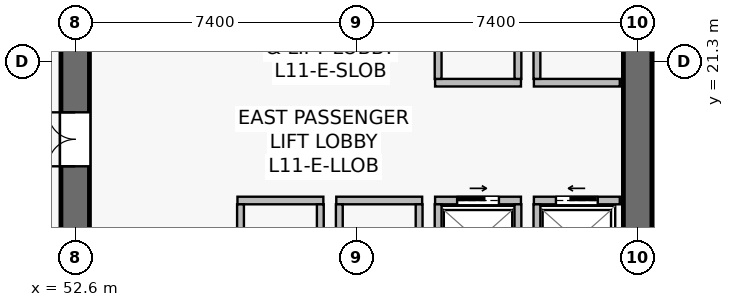
"""IFC4 building model, lengths in metres.
Left out: names, types, materials, properties, quantities, classifications, styles, units other than length and angle.
Written with IfcOpenShell. Run it as: python <this file> out.ifc"""

import sys

from ifc_helpers import new_model, si_unit, direction, frame, frame_2d, origin, place, context, subcontext, project, spatial, rectangle, extrude, source, transform, mapped, element, fill, save


model = new_model("IFC4")
c1 = context("Model", 3, precision=1e-05, world=origin(), true_north=direction((0.0, 1.0)))
c2 = subcontext(c1, "Body", "Model", "MODEL_VIEW")
j1 = project(units=[si_unit("LENGTHUNIT", "METRE"), si_unit("PLANEANGLEUNIT", "RADIAN")], contexts=[c1])
p1 = place(None, origin())
s1 = spatial("IfcSite", under=j1, at=p1, CompositionType="ELEMENT")
p2 = place(p1, origin())
s2 = spatial("IfcBuilding", under=s1, at=p2, CompositionType="ELEMENT")
p3 = place(p2, frame((0.0, 0.0, 45.7)))
s3 = spatial("IfcBuildingStorey", under=s2, at=p3, CompositionType="ELEMENT", Elevation=45.7)
p4 = place(p3, frame((52.6, 15.175, 0.0), z_axis=(0.0, 0.0, 1.0), x_axis=(0.0, 1.0, 0.0)))
e1 = element("IfcWall", 1, at=p4, inside=s3, PredefinedType="SHEAR", context=c2, shape_type="SweptSolid", body=[
    extrude(rectangle(XDim=18.25, YDim=0.75, at=frame_2d((9.125, 0.0))), origin(), (0.0, 0.0, 1.0), 3.78),
])
p5 = place(p4, frame((3.375, 0.0, 0.0)))
e2 = element("IfcOpeningElement", 2, at=p5, cuts=e1, PredefinedType="OPENING", context=c2, shape_type="SweptSolid", body=[
    extrude(rectangle(XDim=1.42, YDim=2.2, at=frame_2d((0.71, 1.1))), frame((0.0, 0.385, 0.0), z_axis=(0.0, -1.0, 0.0), x_axis=(1.0, 0.0, 0.0)), (0.0, 0.0, 1.0), 0.77),
])
p6 = place(p3, frame((67.4, 15.175, 0.0), z_axis=(0.0, 0.0, 1.0), x_axis=(0.0, 1.0, 0.0)))
e3 = element("IfcWall", 3, at=p6, inside=s3, PredefinedType="SHEAR", context=c2, shape_type="SweptSolid", body=[
    extrude(rectangle(XDim=18.25, YDim=0.75, at=frame_2d((9.125, 0.0))), origin(), (0.0, 0.0, 1.0), 3.78),
])
p7 = place(p3, frame((64.67, 17.65, 0.0), z_axis=(0.0, 0.0, 1.0), x_axis=(1.0, 0.0, 0.0)))
e4 = element("IfcWall", 4, at=p7, inside=s3, PredefinedType="SOLIDWALL", context=c2, shape_type="SweptSolid", body=[
    extrude(rectangle(XDim=2.26, YDim=0.2, at=frame_2d((1.13, 0.0))), origin(), (0.0, 0.0, 1.0), 3.78),
])
p8 = place(p7, frame((0.58, 0.0, 0.0)))
e5 = element("IfcOpeningElement", 5, at=p8, cuts=e4, PredefinedType="OPENING", context=c2, shape_type="SweptSolid", body=[
    extrude(rectangle(XDim=1.1, YDim=2.22, at=frame_2d((0.55, 1.11))), frame((0.0, 0.11, 0.0), z_axis=(0.0, -1.0, 0.0), x_axis=(1.0, 0.0, 0.0)), (0.0, 0.0, 1.0), 0.22),
])
p9 = place(p3, frame((64.75, 15.65, 0.0), z_axis=(0.0, 0.0, 1.0), x_axis=(0.0, 1.0, 0.0)))
e6 = element("IfcWall", 6, at=p9, inside=s3, PredefinedType="SOLIDWALL", context=c2, shape_type="SweptSolid", body=[
    extrude(rectangle(XDim=1.9, YDim=0.18, at=frame_2d((0.95, 0.0))), origin(), (0.0, 0.0, 1.0), 3.78),
])
p10 = place(p3, frame((62.07, 17.65, 0.0), z_axis=(0.0, 0.0, 1.0), x_axis=(1.0, 0.0, 0.0)))
e7 = element("IfcWall", 7, at=p10, inside=s3, PredefinedType="SOLIDWALL", context=c2, shape_type="SweptSolid", body=[
    extrude(rectangle(XDim=2.26, YDim=0.2, at=frame_2d((1.13, 0.0))), origin(), (0.0, 0.0, 1.0), 3.78),
])
p11 = place(p10, frame((0.58, 0.0, 0.0)))
e8 = element("IfcOpeningElement", 8, at=p11, cuts=e7, PredefinedType="OPENING", context=c2, shape_type="SweptSolid", body=[
    extrude(rectangle(XDim=1.1, YDim=2.22, at=frame_2d((0.55, 1.11))), frame((0.0, 0.11, 0.0), z_axis=(0.0, -1.0, 0.0), x_axis=(1.0, 0.0, 0.0)), (0.0, 0.0, 1.0), 0.22),
])
for number, where, z_axis, x_axis in (
    (9, (62.15, 15.65, 0.0), (0.0, 0.0, 1.0), (0.0, 1.0, 0.0)),
    (10, (64.25, 15.65, 0.0), (0.0, 0.0, 1.0), (0.0, 1.0, 0.0)),
):
    element("IfcWall", number, at=place(p3, frame(where, z_axis=z_axis, x_axis=x_axis)), inside=s3, PredefinedType="SOLIDWALL", context=c2, shape_type="SweptSolid", body=[
        extrude(rectangle(XDim=1.9, YDim=0.18, at=frame_2d((0.95, 0.0))), origin(), (0.0, 0.0, 1.0), 3.78),
    ])
p12 = place(p3, frame((59.47, 17.65, 0.0), z_axis=(0.0, 0.0, 1.0), x_axis=(1.0, 0.0, 0.0)))
e11 = element("IfcWall", 11, at=p12, inside=s3, PredefinedType="SOLIDWALL", context=c2, shape_type="SweptSolid", body=[
    extrude(rectangle(XDim=2.26, YDim=0.2, at=frame_2d((1.13, 0.0))), origin(), (0.0, 0.0, 1.0), 3.065),
])
for number, where, z_axis, x_axis in (
    (12, (59.55, 15.65, 0.0), (0.0, 0.0, 1.0), (0.0, 1.0, 0.0)),
    (13, (61.65, 15.65, 0.0), (0.0, 0.0, 1.0), (0.0, 1.0, 0.0)),
):
    element("IfcWall", number, at=place(p3, frame(where, z_axis=z_axis, x_axis=x_axis)), inside=s3, PredefinedType="SOLIDWALL", context=c2, shape_type="SweptSolid", body=[
        extrude(rectangle(XDim=1.9, YDim=0.18, at=frame_2d((0.95, 0.0))), origin(), (0.0, 0.0, 1.0), 3.78),
    ])
p13 = place(p3, frame((56.87, 17.65, 0.0), z_axis=(0.0, 0.0, 1.0), x_axis=(1.0, 0.0, 0.0)))
e14 = element("IfcWall", 14, at=p13, inside=s3, PredefinedType="SOLIDWALL", context=c2, shape_type="SweptSolid", body=[
    extrude(rectangle(XDim=2.26, YDim=0.2, at=frame_2d((1.13, 0.0))), origin(), (0.0, 0.0, 1.0), 3.78),
])
for number, where, z_axis, x_axis in (
    (15, (56.95, 15.65, 0.0), (0.0, 0.0, 1.0), (0.0, 1.0, 0.0)),
    (16, (59.05, 15.65, 0.0), (0.0, 0.0, 1.0), (0.0, 1.0, 0.0)),
):
    element("IfcWall", number, at=place(p3, frame(where, z_axis=z_axis, x_axis=x_axis)), inside=s3, PredefinedType="SOLIDWALL", context=c2, shape_type="SweptSolid", body=[
        extrude(rectangle(XDim=1.9, YDim=0.18, at=frame_2d((0.95, 0.0))), origin(), (0.0, 0.0, 1.0), 3.78),
    ])
p14 = place(p3, frame((64.67, 20.75, 0.0), z_axis=(0.0, 0.0, 1.0), x_axis=(1.0, 0.0, 0.0)))
e17 = element("IfcWall", 17, at=p14, inside=s3, PredefinedType="SOLIDWALL", context=c2, shape_type="SweptSolid", body=[
    extrude(rectangle(XDim=2.26, YDim=0.2, at=frame_2d((1.13, 0.0))), origin(), (0.0, 0.0, 1.0), 3.78),
])
p15 = place(p3, frame((64.75, 20.85, 0.0), z_axis=(0.0, 0.0, 1.0), x_axis=(0.0, 1.0, 0.0)))
e18 = element("IfcWall", 18, at=p15, inside=s3, PredefinedType="SOLIDWALL", context=c2, shape_type="SweptSolid", body=[
    extrude(rectangle(XDim=1.9, YDim=0.18, at=frame_2d((0.95, 0.0))), origin(), (0.0, 0.0, 1.0), 3.78),
])
p16 = place(p3, frame((62.07, 20.75, 0.0), z_axis=(0.0, 0.0, 1.0), x_axis=(1.0, 0.0, 0.0)))
e19 = element("IfcWall", 19, at=p16, inside=s3, PredefinedType="SOLIDWALL", context=c2, shape_type="SweptSolid", body=[
    extrude(rectangle(XDim=2.26, YDim=0.2, at=frame_2d((1.13, 0.0))), origin(), (0.0, 0.0, 1.0), 3.78),
])
for number, where, z_axis, x_axis in (
    (20, (62.15, 20.85, 0.0), (0.0, 0.0, 1.0), (0.0, 1.0, 0.0)),
    (21, (64.25, 20.85, 0.0), (0.0, 0.0, 1.0), (0.0, 1.0, 0.0)),
):
    element("IfcWall", number, at=place(p3, frame(where, z_axis=z_axis, x_axis=x_axis)), inside=s3, PredefinedType="SOLIDWALL", context=c2, shape_type="SweptSolid", body=[
        extrude(rectangle(XDim=1.9, YDim=0.18, at=frame_2d((0.95, 0.0))), origin(), (0.0, 0.0, 1.0), 3.78),
    ])
m1 = source(origin(), c2, "Body", "SweptSolid", [
    extrude(rectangle(XDim=1.1, YDim=2.22, at=frame_2d((0.55, 1.11))), frame((0.0, 0.025, 0.0), z_axis=(0.0, -1.0, 0.0), x_axis=(1.0, 0.0, 0.0)), (0.0, 0.0, 1.0), 0.05),
])
p17 = place(p8, origin())
e22 = element("IfcDoor", 22, at=p17, inside=s3, OperationType="SLIDING_TO_LEFT", PredefinedType="USERDEFINED", context=c2, shape_type="MappedRepresentation", body=[
    mapped(m1, transform((0.0, 0.0, 0.0), scale=1.0)),
])
fill(e5, e22)
p18 = place(p11, origin())
e23 = element("IfcDoor", 23, at=p18, inside=s3, OperationType="SLIDING_TO_RIGHT", PredefinedType="USERDEFINED", context=c2, shape_type="MappedRepresentation", body=[
    mapped(m1, transform((0.0, 0.0, 0.0), scale=1.0)),
])
fill(e8, e23)
m2 = source(origin(), c2, "Body", "SweptSolid", [
    extrude(rectangle(XDim=1.42, YDim=2.2, at=frame_2d((0.71, 1.1))), frame((0.0, 0.025, 0.0), z_axis=(0.0, -1.0, 0.0), x_axis=(1.0, 0.0, 0.0)), (0.0, 0.0, 1.0), 0.05),
])
p19 = place(p5, origin())
e24 = element("IfcDoor", 24, at=p19, inside=s3, OperationType="DOUBLE_DOOR_SINGLE_SWING", PredefinedType="DOOR", context=c2, shape_type="MappedRepresentation", body=[
    mapped(m2, transform((0.0, 0.0, 0.0), scale=1.0)),
])
fill(e2, e24)
save(model, sys.argv[1])
